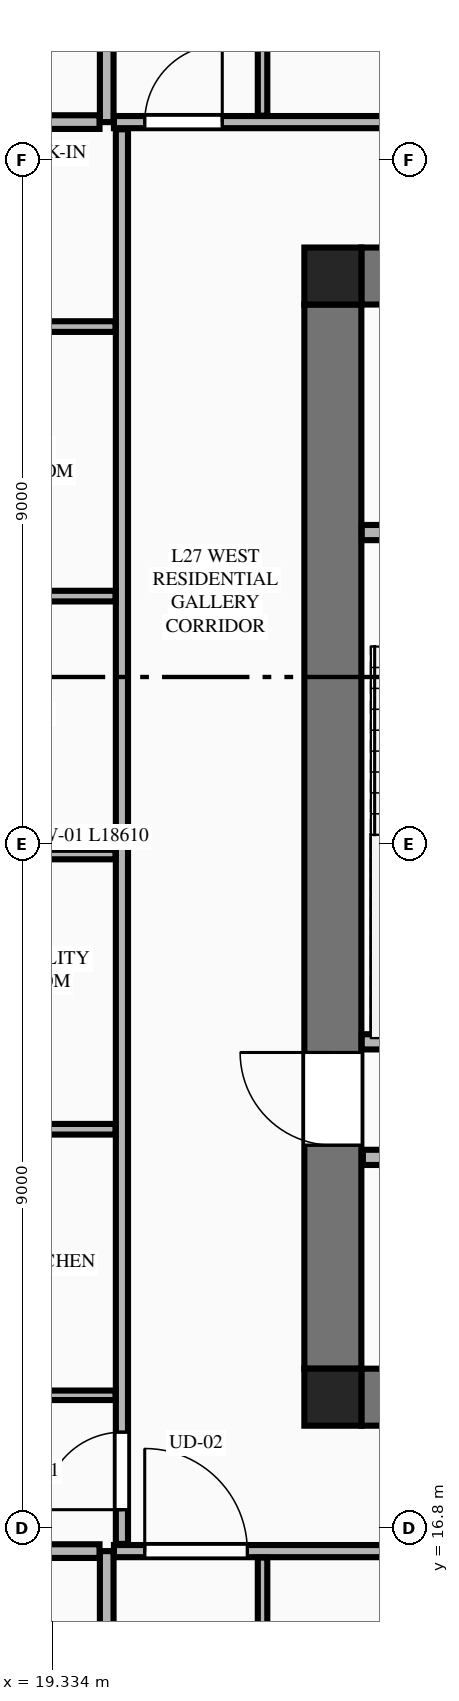
"""IFC4 building model, lengths in metres.
Left out: names, types, materials, properties, quantities, classifications, styles, units other than length and angle.
Written with IfcOpenShell. Run it as: python <this file> out.ifc"""

import sys

from ifc_helpers import new_model, si_unit, direction, frame, frame_2d, origin, origin_2d, place, context, subcontext, project, spatial, rectangle, extrude, element, fill, save


model = new_model("IFC4")
c1 = context("Model", 3, precision=1e-05, world=origin(), true_north=direction((0.0, 1.0)))
c2 = subcontext(c1, "Body", "Model", "MODEL_VIEW")
j1 = project(units=[si_unit("LENGTHUNIT", "METRE"), si_unit("PLANEANGLEUNIT", "RADIAN")], contexts=[c1])
p1 = place(None, origin())
s1 = spatial("IfcSite", under=j1, at=p1, CompositionType="ELEMENT")
p2 = place(p1, origin())
s2 = spatial("IfcBuilding", under=s1, at=p2, CompositionType="ELEMENT")
p3 = place(p2, frame((0.0, 0.0, 105.5)))
s3 = spatial("IfcBuildingStorey", under=s2, at=p3, CompositionType="ELEMENT", Elevation=105.5)
for number, where, z_axis, x_axis in (
    (1, (23.025, 18.525, 0.0), (0.0, 0.0, 1.0), (1.0, 0.0, 0.0)),
    (2, (23.025, 33.275, 0.0), (0.0, 0.0, 1.0), (1.0, 0.0, 0.0)),
):
    element("IfcColumn", number, at=place(p3, frame(where, z_axis=z_axis, x_axis=x_axis)), inside=s3, PredefinedType="COLUMN", context=c2, shape_type="SweptSolid", body=[
        extrude(rectangle(XDim=0.75, YDim=0.75, at=origin_2d()), origin(), (0.0, 0.0, 1.0), 3.55),
    ])
for number, where, z_axis, x_axis in (
    (3, (23.4, 18.525, 0.0), (0.0, 0.0, 1.0), (1.0, 0.0, 0.0)),
    (4, (23.4, 33.275, 0.0), (0.0, 0.0, 1.0), (1.0, 0.0, 0.0)),
):
    element("IfcWall", number, at=place(p3, frame(where, z_axis=z_axis, x_axis=x_axis)), inside=s3, PredefinedType="SHEAR", context=c2, shape_type="SweptSolid", body=[
        extrude(rectangle(XDim=18.0, YDim=0.75, at=frame_2d((9.0, 0.0))), origin(), (0.0, 0.0, 1.0), 3.34),
    ])
p4 = place(p3, frame((23.025, 18.9, 0.0), z_axis=(0.0, 0.0, 1.0), x_axis=(0.0, 1.0, 0.0)))
e5 = element("IfcWall", 5, at=p4, inside=s3, PredefinedType="SHEAR", context=c2, shape_type="SweptSolid", body=[
    extrude(rectangle(XDim=14.0, YDim=0.75, at=frame_2d((7.0, 0.0))), origin(), (0.0, 0.0, 1.0), 3.34),
])
p5 = place(p4, frame((2.94, 0.0, 0.0)))
e6 = element("IfcOpeningElement", 6, at=p5, cuts=e5, PredefinedType="OPENING", context=c2, shape_type="SweptSolid", body=[
    extrude(rectangle(XDim=1.22, YDim=2.25, at=frame_2d((0.61, 1.125))), frame((0.0, 0.385, 0.0), z_axis=(0.0, -1.0, 0.0), x_axis=(1.0, 0.0, 0.0)), (0.0, 0.0, 1.0), 0.77),
])
p6 = place(p3, frame((23.405, 23.2, 0.0), z_axis=(0.0, 0.0, 1.0), x_axis=(1.0, 0.0, 0.0)))
e7 = element("IfcWall", 7, at=p6, inside=s3, PredefinedType="PLUMBINGWALL", context=c2, shape_type="SweptSolid", body=[
    extrude(rectangle(XDim=3.27, YDim=0.2, at=frame_2d((1.635, 0.0))), origin(), (0.0, 0.0, 1.0), 3.34),
])
p7 = place(p3, frame((23.405, 29.9, 0.0), z_axis=(0.0, 0.0, 1.0), x_axis=(1.0, 0.0, 0.0)))
e8 = element("IfcWall", 8, at=p7, inside=s3, PredefinedType="PLUMBINGWALL", context=c2, shape_type="SweptSolid", body=[
    extrude(rectangle(XDim=3.27, YDim=0.2, at=frame_2d((1.635, 0.0))), origin(), (0.0, 0.0, 1.0), 3.34),
])
p8 = place(p7, frame((1.85, 0.0, 0.0)))
e9 = element("IfcOpeningElement", 9, at=p8, cuts=e8, PredefinedType="OPENING", context=c2, shape_type="SweptSolid", body=[
    extrude(rectangle(XDim=0.85, YDim=2.05, at=frame_2d((0.425, 1.025))), frame((0.0, 0.11, 0.0), z_axis=(0.0, -1.0, 0.0), x_axis=(1.0, 0.0, 0.0)), (0.0, 0.0, 1.0), 0.22),
])
p9 = place(p3, frame((23.42, 21.68, 0.0), z_axis=(0.0, 0.0, 1.0), x_axis=(1.0, 0.0, 0.0)))
e10 = element("IfcWall", 10, at=p9, inside=s3, PredefinedType="PLUMBINGWALL", context=c2, shape_type="SweptSolid", body=[
    extrude(rectangle(XDim=17.96, YDim=0.2, at=frame_2d((8.98, 0.0))), origin(), (0.0, 0.0, 1.0), 3.34),
])
p10 = place(p9, frame((11.6, 0.0, 0.0)))
e11 = element("IfcOpeningElement", 11, at=p10, cuts=e10, PredefinedType="OPENING", context=c2, shape_type="SweptSolid", body=[
    extrude(rectangle(XDim=1.1, YDim=2.2, at=frame_2d((0.55, 1.1))), frame((0.0, 0.11, 0.0), z_axis=(0.0, -1.0, 0.0), x_axis=(1.0, 0.0, 0.0)), (0.0, 0.0, 1.0), 0.22),
])
p11 = place(p9, frame((0.41, 0.0, 0.0)))
e12 = element("IfcOpeningElement", 12, at=p11, cuts=e10, PredefinedType="OPENING", context=c2, shape_type="SweptSolid", body=[
    extrude(rectangle(XDim=0.85, YDim=2.05, at=frame_2d((0.425, 1.025))), frame((0.0, 0.11, 0.0), z_axis=(0.0, -1.0, 0.0), x_axis=(1.0, 0.0, 0.0)), (0.0, 0.0, 1.0), 0.22),
])
p12 = place(p9, frame((6.03, 0.0, 0.0)))
e13 = element("IfcOpeningElement", 13, at=p12, cuts=e10, PredefinedType="OPENING", context=c2, shape_type="SweptSolid", body=[
    extrude(rectangle(XDim=0.85, YDim=2.05, at=frame_2d((0.425, 1.025))), frame((0.0, 0.11, 0.0), z_axis=(0.0, -1.0, 0.0), x_axis=(1.0, 0.0, 0.0)), (0.0, 0.0, 1.0), 0.22),
])
p13 = place(p9, frame((13.78, 0.0, 0.0)))
e14 = element("IfcOpeningElement", 14, at=p13, cuts=e10, PredefinedType="OPENING", context=c2, shape_type="SweptSolid", body=[
    extrude(rectangle(XDim=0.85, YDim=2.05, at=frame_2d((0.425, 1.025))), frame((0.0, 0.11, 0.0), z_axis=(0.0, -1.0, 0.0), x_axis=(1.0, 0.0, 0.0)), (0.0, 0.0, 1.0), 0.22),
])
p14 = place(p3, frame((20.05, 4.105, 0.0), z_axis=(0.0, 0.0, 1.0), x_axis=(0.0, 1.0, 0.0)))
e15 = element("IfcWall", 15, at=p14, inside=s3, PredefinedType="PARTITIONING", context=c2, shape_type="SweptSolid", body=[
    extrude(rectangle(XDim=12.395, YDim=0.18, at=frame_2d((6.198, 0.0))), origin(), (0.0, 0.0, 1.0), 3.34),
])
p15 = place(p3, frame((20.145, 16.5, 0.0), z_axis=(0.0, 0.0, 1.0), x_axis=(1.0, 0.0, 0.0)))
e16 = element("IfcWall", 16, at=p15, inside=s3, PredefinedType="PARTITIONING", context=c2, shape_type="SweptSolid", body=[
    extrude(rectangle(XDim=15.992, YDim=0.16, at=frame_2d((7.996, 0.0))), origin(), (0.0, 0.0, 1.0), 3.34),
])
p16 = place(p15, frame((0.405, 0.0, 0.0)))
e17 = element("IfcOpeningElement", 17, at=p16, cuts=e16, PredefinedType="OPENING", context=c2, shape_type="SweptSolid", body=[
    extrude(rectangle(XDim=1.35, YDim=2.35, at=frame_2d((0.675, 1.175))), frame((0.0, 0.09, 0.0), z_axis=(0.0, -1.0, 0.0), x_axis=(1.0, 0.0, 0.0)), (0.0, 0.0, 1.0), 0.18),
])
p17 = place(p3, frame((22.1, 10.036, 0.0), z_axis=(0.0, 0.0, 1.0), x_axis=(0.0, 1.0, 0.0)))
e18 = element("IfcWall", 18, at=p17, inside=s3, PredefinedType="PARTITIONING", context=c2, shape_type="SweptSolid", body=[
    extrude(rectangle(XDim=6.379, YDim=0.125, at=frame_2d((3.189, 0.0))), origin(), (0.0, 0.0, 1.0), 2.722),
])
p18 = place(p3, frame((20.05, 35.3, 0.0), z_axis=(0.0, 0.0, 1.0), x_axis=(0.0, 1.0, 0.0)))
e19 = element("IfcWall", 19, at=p18, inside=s3, PredefinedType="PARTITIONING", context=c2, shape_type="SweptSolid", body=[
    extrude(rectangle(XDim=12.195, YDim=0.18, at=frame_2d((6.098, 0.0))), origin(), (0.0, 0.0, 1.0), 3.34),
])
p19 = place(p3, frame((20.145, 35.3, 0.0), z_axis=(0.0, 0.0, 1.0), x_axis=(1.0, 0.0, 0.0)))
e20 = element("IfcWall", 20, at=p19, inside=s3, PredefinedType="PARTITIONING", context=c2, shape_type="SweptSolid", body=[
    extrude(rectangle(XDim=8.328, YDim=0.16, at=frame_2d((4.164, 0.0))), origin(), (0.0, 0.0, 1.0), 3.34),
])
p20 = place(p19, frame((0.405, 0.0, 0.0)))
e21 = element("IfcOpeningElement", 21, at=p20, cuts=e20, PredefinedType="OPENING", context=c2, shape_type="SweptSolid", body=[
    extrude(rectangle(XDim=1.02, YDim=2.25, at=frame_2d((0.51, 1.125))), frame((0.0, 0.09, 0.0), z_axis=(0.0, -1.0, 0.0), x_axis=(1.0, 0.0, 0.0)), (0.0, 0.0, 1.0), 0.18),
])
p21 = place(p3, frame((22.1, 35.385, 0.0), z_axis=(0.0, 0.0, 1.0), x_axis=(0.0, 1.0, 0.0)))
e22 = element("IfcWall", 22, at=p21, inside=s3, PredefinedType="PARTITIONING", context=c2, shape_type="SweptSolid", body=[
    extrude(rectangle(XDim=5.42, YDim=0.125, at=frame_2d((2.71, 0.0))), origin(), (0.0, 0.0, 1.0), 2.722),
])
p22 = place(p3, frame((12.185, 16.5, 0.0), z_axis=(0.0, 0.0, 1.0), x_axis=(1.0, 0.0, 0.0)))
e23 = element("IfcWall", 23, at=p22, inside=s3, PredefinedType="PARTITIONING", context=c2, shape_type="SweptSolid", body=[
    extrude(rectangle(XDim=7.77, YDim=0.18, at=frame_2d((3.885, 0.0))), origin(), (0.0, 0.0, 1.0), 3.34),
])
p23 = place(p3, frame((12.286, 35.3, 0.0), z_axis=(0.0, 0.0, 1.0), x_axis=(1.0, 0.0, 0.0)))
e24 = element("IfcWall", 24, at=p23, inside=s3, PredefinedType="PARTITIONING", context=c2, shape_type="SweptSolid", body=[
    extrude(rectangle(XDim=7.669, YDim=0.18, at=frame_2d((3.834, 0.0))), origin(), (0.0, 0.0, 1.0), 3.34),
])
p24 = place(p3, frame((20.25, 16.595, 0.0), z_axis=(0.0, 0.0, 1.0), x_axis=(0.0, 1.0, 0.0)))
e25 = element("IfcWall", 25, at=p24, inside=s3, PredefinedType="PARTITIONING", context=c2, shape_type="SweptSolid", body=[
    extrude(rectangle(XDim=18.61, YDim=0.16, at=frame_2d((9.305, 0.0))), origin(), (0.0, 0.0, 1.0), 3.34),
])
p25 = place(p24, frame((0.45, 0.0, 0.0)))
e26 = element("IfcOpeningElement", 26, at=p25, cuts=e25, PredefinedType="OPENING", context=c2, shape_type="SweptSolid", body=[
    extrude(rectangle(XDim=1.02, YDim=2.25, at=frame_2d((0.51, 1.125))), frame((0.0, 0.09, 0.0), z_axis=(0.0, -1.0, 0.0), x_axis=(1.0, 0.0, 0.0)), (0.0, 0.0, 1.0), 0.18),
])
p26 = place(p3, frame((16.185, 18.55, 0.0), z_axis=(0.0, 0.0, 1.0), x_axis=(1.0, 0.0, 0.0)))
e27 = element("IfcWall", 27, at=p26, inside=s3, PredefinedType="PARTITIONING", context=c2, shape_type="SweptSolid", body=[
    extrude(rectangle(XDim=3.98, YDim=0.125, at=frame_2d((1.99, 0.0))), origin(), (0.0, 0.0, 1.0), 2.722),
])
for number, where, z_axis, x_axis in (
    (28, (16.185, 29.064, 0.0), (0.0, 0.0, 1.0), (1.0, 0.0, 0.0)),
    (29, (16.185, 22.05, 0.0), (0.0, 0.0, 1.0), (1.0, 0.0, 0.0)),
):
    element("IfcWall", number, at=place(p3, frame(where, z_axis=z_axis, x_axis=x_axis)), inside=s3, PredefinedType="PLUMBINGWALL", context=c2, shape_type="SweptSolid", body=[
        extrude(rectangle(XDim=3.98, YDim=0.14, at=frame_2d((1.99, 0.0))), origin(), (0.0, 0.0, 1.0), 3.34),
    ])
p27 = place(p3, frame((16.185, 25.664, 0.0), z_axis=(0.0, 0.0, 1.0), x_axis=(1.0, 0.0, 0.0)))
e30 = element("IfcWall", 30, at=p27, inside=s3, PredefinedType="PARTITIONING", context=c2, shape_type="SweptSolid", body=[
    extrude(rectangle(XDim=3.98, YDim=0.125, at=frame_2d((1.99, 0.0))), origin(), (0.0, 0.0, 1.0), 3.34),
])
p28 = place(p3, frame((16.185, 32.61, 0.0), z_axis=(0.0, 0.0, 1.0), x_axis=(1.0, 0.0, 0.0)))
e31 = element("IfcWall", 31, at=p28, inside=s3, PredefinedType="PLUMBINGWALL", context=c2, shape_type="SweptSolid", body=[
    extrude(rectangle(XDim=3.98, YDim=0.14, at=frame_2d((1.99, 0.0))), origin(), (0.0, 0.0, 1.0), 3.34),
])
p29 = place(p5, origin())
e32 = element("IfcDoor", 32, at=p29, inside=s3, OperationType="SINGLE_SWING_RIGHT", PredefinedType="DOOR", context=c2, shape_type="SweptSolid", body=[
    extrude(rectangle(XDim=1.22, YDim=2.25, at=frame_2d((0.61, 1.125))), frame((0.0, 0.025, 0.0), z_axis=(0.0, -1.0, 0.0), x_axis=(1.0, 0.0, 0.0)), (0.0, 0.0, 1.0), 0.05),
])
fill(e6, e32)
p30 = place(p16, origin())
e33 = element("IfcDoor", 33, at=p30, inside=s3, OperationType="SINGLE_SWING_LEFT", PredefinedType="DOOR", context=c2, shape_type="SweptSolid", body=[
    extrude(rectangle(XDim=1.35, YDim=2.35, at=frame_2d((0.675, 1.175))), frame((0.0, 0.025, 0.0), z_axis=(0.0, -1.0, 0.0), x_axis=(1.0, 0.0, 0.0)), (0.0, 0.0, 1.0), 0.05),
])
fill(e17, e33)
p31 = place(p20, origin())
e34 = element("IfcDoor", 34, at=p31, inside=s3, OperationType="SINGLE_SWING_RIGHT", PredefinedType="DOOR", context=c2, shape_type="SweptSolid", body=[
    extrude(rectangle(XDim=1.02, YDim=2.25, at=frame_2d((0.51, 1.125))), frame((0.0, 0.025, 0.0), z_axis=(0.0, -1.0, 0.0), x_axis=(1.0, 0.0, 0.0)), (0.0, 0.0, 1.0), 0.05),
])
fill(e21, e34)
p32 = place(p25, origin())
e35 = element("IfcDoor", 35, at=p32, inside=s3, OperationType="SINGLE_SWING_LEFT", PredefinedType="DOOR", context=c2, shape_type="SweptSolid", body=[
    extrude(rectangle(XDim=1.02, YDim=2.25, at=frame_2d((0.51, 1.125))), frame((0.0, 0.025, 0.0), z_axis=(0.0, -1.0, 0.0), x_axis=(1.0, 0.0, 0.0)), (0.0, 0.0, 1.0), 0.05),
])
fill(e26, e35)
save(model, sys.argv[1])
